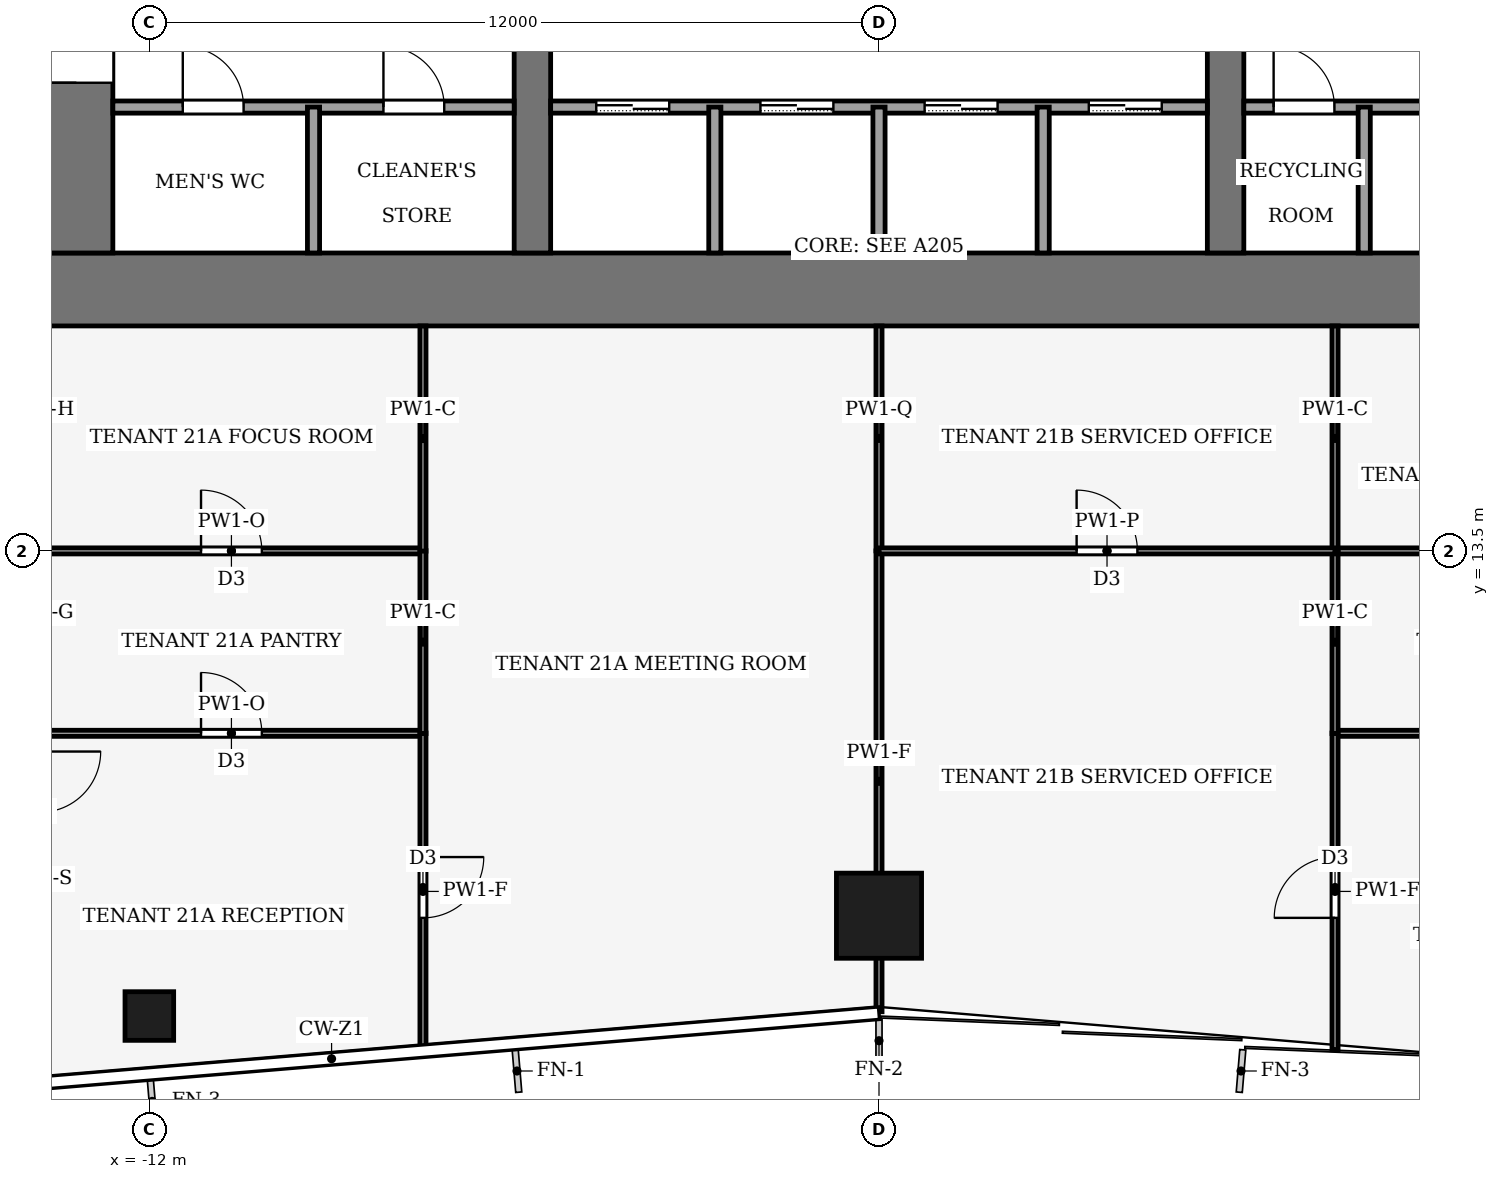
"""IFC4 building model, lengths in metres.
Left out: names, types, materials, properties, quantities, classifications, styles, units other than length and angle.
Written with IfcOpenShell. Run it as: python <this file> out.ifc"""

import sys

from ifc_helpers import new_model, si_unit, direction, frame, frame_2d, origin, origin_2d, place, context, subcontext, project, spatial, rectangle, hollow_rectangle, extrude, element, fill, save


model = new_model("IFC4")
c1 = context("Model", 3, precision=1e-05, world=origin(), true_north=direction((0.0, 1.0)))
c2 = subcontext(c1, "Body", "Model", "MODEL_VIEW")
j1 = project(units=[si_unit("LENGTHUNIT", "METRE"), si_unit("PLANEANGLEUNIT", "RADIAN")], contexts=[c1])
p1 = place(None, origin())
s1 = spatial("IfcSite", under=j1, at=p1, CompositionType="ELEMENT")
p2 = place(p1, origin())
s2 = spatial("IfcBuilding", under=s1, at=p2, CompositionType="ELEMENT")
p3 = place(p2, frame((0.0, 0.0, 94.0)))
s3 = spatial("IfcBuildingStorey", under=s2, at=p3, CompositionType="ELEMENT", Elevation=94.0)
p4 = place(p3, frame((-13.8, 17.8, -0.13), z_axis=(0.0, 0.0, 1.0), x_axis=(1.0, 0.0, 0.0)))
e1 = element("IfcWall", 1, at=p4, inside=s3, PredefinedType="SHEAR", context=c2, shape_type="SweptSolid", body=[
    extrude(rectangle(XDim=27.6, YDim=1.2, at=frame_2d((13.8, 0.0))), origin(), (0.0, 0.0, 1.0), 4.0),
])
p5 = place(p3, frame((-13.2, 18.4, -0.13), z_axis=(0.0, 0.0, 1.0), x_axis=(0.0, 1.0, 0.0)))
e2 = element("IfcWall", 2, at=p5, inside=s3, PredefinedType="SHEAR", context=c2, shape_type="SweptSolid", body=[
    extrude(rectangle(XDim=19.2, YDim=1.2, at=frame_2d((9.6, 0.0))), origin(), (0.0, 0.0, 1.0), 4.0),
])
p6 = place(p5, frame((2.8, 0.0, 0.13)))
e3 = element("IfcOpeningElement", 3, at=p6, cuts=e2, PredefinedType="OPENING", context=c2, shape_type="SweptSolid", body=[
    extrude(rectangle(XDim=2.4, YDim=2.4, at=frame_2d((1.2, 1.2))), frame((0.0, 0.61, 0.0), z_axis=(0.0, -1.0, 0.0), x_axis=(1.0, 0.0, 0.0)), (0.0, 0.0, 1.0), 1.22),
])
p7 = place(p5, frame((13.4, 0.0, 0.13)))
e4 = element("IfcOpeningElement", 4, at=p7, cuts=e2, PredefinedType="OPENING", context=c2, shape_type="SweptSolid", body=[
    extrude(rectangle(XDim=1.4, YDim=2.2, at=frame_2d((0.7, 1.1))), frame((0.0, 0.61, 0.0), z_axis=(0.0, -1.0, 0.0), x_axis=(1.0, 0.0, 0.0)), (0.0, 0.0, 1.0), 1.22),
])
p8 = place(p3, frame((-5.7, 18.4, -0.13), z_axis=(0.0, 0.0, 1.0), x_axis=(0.0, 1.0, 0.0)))
e5 = element("IfcWall", 5, at=p8, inside=s3, PredefinedType="SHEAR", context=c2, shape_type="SweptSolid", body=[
    extrude(rectangle(XDim=19.2, YDim=0.6, at=frame_2d((9.6, 0.0))), origin(), (0.0, 0.0, 1.0), 4.0),
])
p9 = place(p8, frame((8.35, 0.0, 0.13)))
e6 = element("IfcOpeningElement", 6, at=p9, cuts=e5, PredefinedType="OPENING", context=c2, shape_type="SweptSolid", body=[
    extrude(rectangle(XDim=0.9, YDim=2.1, at=frame_2d((0.45, 1.05))), frame((0.0, 0.31, 0.0), z_axis=(0.0, -1.0, 0.0), x_axis=(1.0, 0.0, 0.0)), (0.0, 0.0, 1.0), 0.62),
])
p10 = place(p3, frame((5.7, 18.4, -0.13), z_axis=(0.0, 0.0, 1.0), x_axis=(0.0, 1.0, 0.0)))
e7 = element("IfcWall", 7, at=p10, inside=s3, PredefinedType="SHEAR", context=c2, shape_type="SweptSolid", body=[
    extrude(rectangle(XDim=19.2, YDim=0.6, at=frame_2d((9.6, 0.0))), origin(), (0.0, 0.0, 1.0), 4.0),
])
p11 = place(p10, frame((8.35, 0.0, 0.13)))
e8 = element("IfcOpeningElement", 8, at=p11, cuts=e7, PredefinedType="OPENING", context=c2, shape_type="SweptSolid", body=[
    extrude(rectangle(XDim=0.9, YDim=2.1, at=frame_2d((0.45, 1.05))), frame((0.0, 0.31, 0.0), z_axis=(0.0, -1.0, 0.0), x_axis=(1.0, 0.0, 0.0)), (0.0, 0.0, 1.0), 0.62),
])
p12 = place(p10, frame((13.3, 0.0, 0.13)))
e9 = element("IfcOpeningElement", 9, at=p12, cuts=e7, PredefinedType="OPENING", context=c2, shape_type="SweptSolid", body=[
    extrude(rectangle(XDim=2.4, YDim=2.4, at=frame_2d((1.2, 1.2))), frame((0.0, 0.31, 0.0), z_axis=(0.0, -1.0, 0.0), x_axis=(1.0, 0.0, 0.0)), (0.0, 0.0, 1.0), 0.62),
])
p13 = place(p3, frame((0.0, 7.5, 0.0), z_axis=(0.0, 0.0, 1.0), x_axis=(1.0, 0.0, 0.0)))
e10 = element("IfcColumn", 10, at=p13, inside=s3, PredefinedType="COLUMN", context=c2, shape_type="SweptSolid", body=[
    extrude(hollow_rectangle(XDim=1.4, YDim=1.4, WallThickness=0.08, at=origin_2d()), origin(), (0.0, 0.0, 1.0), 4.0),
])
p14 = place(p3, frame((-12.0, 5.85, 0.0), z_axis=(0.0, 0.0, 1.0), x_axis=(1.0, 0.0, 0.0)))
e11 = element("IfcColumn", 11, at=p14, inside=s3, PredefinedType="COLUMN", context=c2, shape_type="SweptSolid", body=[
    extrude(hollow_rectangle(XDim=0.8, YDim=0.8, WallThickness=0.04, at=origin_2d()), origin(), (0.0, 0.0, 1.0), 4.0),
])
p15 = place(p3, frame((-12.6, 20.8, 0.0), z_axis=(0.0, 0.0, 1.0), x_axis=(1.0, 0.0, 0.0)))
e12 = element("IfcWall", 12, at=p15, inside=s3, PredefinedType="PARTITIONING", context=c2, shape_type="SweptSolid", body=[
    extrude(rectangle(XDim=6.6, YDim=0.2, at=frame_2d((3.3, 0.0))), origin(), (0.0, 0.0, 1.0), 3.87),
])
p16 = place(p15, frame((1.15, 0.0, 0.0)))
e13 = element("IfcOpeningElement", 13, at=p16, cuts=e12, PredefinedType="OPENING", context=c2, shape_type="SweptSolid", body=[
    extrude(rectangle(XDim=1.0, YDim=2.1, at=frame_2d((0.5, 1.05))), frame((0.0, 0.11, 0.0), z_axis=(0.0, -1.0, 0.0), x_axis=(1.0, 0.0, 0.0)), (0.0, 0.0, 1.0), 0.22),
])
p17 = place(p15, frame((4.45, 0.0, 0.0)))
e14 = element("IfcOpeningElement", 14, at=p17, cuts=e12, PredefinedType="OPENING", context=c2, shape_type="SweptSolid", body=[
    extrude(rectangle(XDim=1.0, YDim=2.1, at=frame_2d((0.5, 1.05))), frame((0.0, 0.11, 0.0), z_axis=(0.0, -1.0, 0.0), x_axis=(1.0, 0.0, 0.0)), (0.0, 0.0, 1.0), 0.22),
])
p18 = place(p3, frame((-5.4, 20.8, 0.0), z_axis=(0.0, 0.0, 1.0), x_axis=(1.0, 0.0, 0.0)))
e15 = element("IfcWall", 15, at=p18, inside=s3, PredefinedType="PARTITIONING", context=c2, shape_type="SweptSolid", body=[
    extrude(rectangle(XDim=10.8, YDim=0.2, at=frame_2d((5.4, 0.0))), origin(), (0.0, 0.0, 1.0), 3.87),
])
p19 = place(p18, frame((0.75, 0.0, 0.0)))
e16 = element("IfcOpeningElement", 16, at=p19, cuts=e15, PredefinedType="OPENING", context=c2, shape_type="SweptSolid", body=[
    extrude(rectangle(XDim=1.2, YDim=2.2, at=frame_2d((0.6, 1.1))), frame((0.0, 0.11, 0.0), z_axis=(0.0, -1.0, 0.0), x_axis=(1.0, 0.0, 0.0)), (0.0, 0.0, 1.0), 0.22),
])
p20 = place(p18, frame((3.45, 0.0, 0.0)))
e17 = element("IfcOpeningElement", 17, at=p20, cuts=e15, PredefinedType="OPENING", context=c2, shape_type="SweptSolid", body=[
    extrude(rectangle(XDim=1.2, YDim=2.2, at=frame_2d((0.6, 1.1))), frame((0.0, 0.11, 0.0), z_axis=(0.0, -1.0, 0.0), x_axis=(1.0, 0.0, 0.0)), (0.0, 0.0, 1.0), 0.22),
])
p21 = place(p18, frame((6.15, 0.0, 0.0)))
e18 = element("IfcOpeningElement", 18, at=p21, cuts=e15, PredefinedType="OPENING", context=c2, shape_type="SweptSolid", body=[
    extrude(rectangle(XDim=1.2, YDim=2.2, at=frame_2d((0.6, 1.1))), frame((0.0, 0.11, 0.0), z_axis=(0.0, -1.0, 0.0), x_axis=(1.0, 0.0, 0.0)), (0.0, 0.0, 1.0), 0.22),
])
p22 = place(p18, frame((8.85, 0.0, 0.0)))
e19 = element("IfcOpeningElement", 19, at=p22, cuts=e15, PredefinedType="OPENING", context=c2, shape_type="SweptSolid", body=[
    extrude(rectangle(XDim=1.2, YDim=2.2, at=frame_2d((0.6, 1.1))), frame((0.0, 0.11, 0.0), z_axis=(0.0, -1.0, 0.0), x_axis=(1.0, 0.0, 0.0)), (0.0, 0.0, 1.0), 0.22),
])
p23 = place(p3, frame((6.0, 20.8, 0.0), z_axis=(0.0, 0.0, 1.0), x_axis=(1.0, 0.0, 0.0)))
e20 = element("IfcWall", 20, at=p23, inside=s3, PredefinedType="PARTITIONING", context=c2, shape_type="SweptSolid", body=[
    extrude(rectangle(XDim=6.6, YDim=0.2, at=frame_2d((3.3, 0.0))), origin(), (0.0, 0.0, 1.0), 3.87),
])
p24 = place(p23, frame((0.49, 0.0, 0.0)))
e21 = element("IfcOpeningElement", 21, at=p24, cuts=e20, PredefinedType="OPENING", context=c2, shape_type="SweptSolid", body=[
    extrude(rectangle(XDim=1.0, YDim=2.1, at=frame_2d((0.5, 1.05))), frame((0.0, 0.11, 0.0), z_axis=(0.0, -1.0, 0.0), x_axis=(1.0, 0.0, 0.0)), (0.0, 0.0, 1.0), 0.22),
])
p25 = place(p23, frame((3.79, 0.0, 0.0)))
e22 = element("IfcOpeningElement", 22, at=p25, cuts=e20, PredefinedType="OPENING", context=c2, shape_type="SweptSolid", body=[
    extrude(rectangle(XDim=1.0, YDim=2.1, at=frame_2d((0.5, 1.05))), frame((0.0, 0.11, 0.0), z_axis=(0.0, -1.0, 0.0), x_axis=(1.0, 0.0, 0.0)), (0.0, 0.0, 1.0), 0.22),
])
for number, where, z_axis, x_axis in (
    (23, (-9.3, 18.4, 0.0), (0.0, 0.0, 1.0), (0.0, 1.0, 0.0)),
    (24, (-2.7, 18.4, 0.0), (0.0, 0.0, 1.0), (0.0, 1.0, 0.0)),
    (25, (0.0, 18.4, 0.0), (0.0, 0.0, 1.0), (0.0, 1.0, 0.0)),
    (26, (2.7, 18.4, 0.0), (0.0, 0.0, 1.0), (0.0, 1.0, 0.0)),
    (27, (7.98, 18.4, 0.0), (0.0, 0.0, 1.0), (0.0, 1.0, 0.0)),
):
    element("IfcWall", number, at=place(p3, frame(where, z_axis=z_axis, x_axis=x_axis)), inside=s3, PredefinedType="PARTITIONING", context=c2, shape_type="SweptSolid", body=[
        extrude(rectangle(XDim=2.4, YDim=0.2, at=frame_2d((1.2, 0.0))), origin(), (0.0, 0.0, 1.0), 3.87),
    ])
p26 = place(p3, frame((-13.8, 10.5, 0.0), z_axis=(0.0, 0.0, 1.0), x_axis=(1.0, 0.0, 0.0)))
e28 = element("IfcWall", 28, at=p26, inside=s3, PredefinedType="PARTITIONING", context=c2, shape_type="SweptSolid", body=[
    extrude(rectangle(XDim=6.3, YDim=0.1, at=frame_2d((3.15, 0.0))), origin(), (0.0, 0.0, 1.0), 3.39),
])
p27 = place(p26, frame((2.65, 0.0, 0.0)))
e29 = element("IfcOpeningElement", 29, at=p27, cuts=e28, PredefinedType="OPENING", context=c2, shape_type="SweptSolid", body=[
    extrude(rectangle(XDim=1.0, YDim=2.1, at=frame_2d((0.5, 1.05))), frame((0.0, 0.06, 0.0), z_axis=(0.0, -1.0, 0.0), x_axis=(1.0, 0.0, 0.0)), (0.0, 0.0, 1.0), 0.12),
])
p28 = place(p3, frame((-7.5, 10.504, 0.0), z_axis=(0.0, 0.0, 1.0), x_axis=(0.0, -1.0, 0.0)))
e30 = element("IfcWall", 30, at=p28, inside=s3, PredefinedType="PARTITIONING", context=c2, shape_type="SweptSolid", body=[
    extrude(rectangle(XDim=5.209, YDim=0.1, at=frame_2d((2.604, 0.0))), origin(), (0.0, 0.0, 1.0), 3.04),
])
p29 = place(p28, frame((2.039, 0.0, 0.0)))
e31 = element("IfcOpeningElement", 31, at=p29, cuts=e30, PredefinedType="OPENING", context=c2, shape_type="SweptSolid", body=[
    extrude(rectangle(XDim=1.0, YDim=2.1, at=frame_2d((0.5, 1.05))), frame((0.0, 0.06, 0.0), z_axis=(0.0, -1.0, 0.0), x_axis=(1.0, 0.0, 0.0)), (0.0, 0.0, 1.0), 0.12),
])
p30 = place(p3, frame((-13.8, 13.5, 0.0), z_axis=(0.0, 0.0, 1.0), x_axis=(1.0, 0.0, 0.0)))
e32 = element("IfcWall", 32, at=p30, inside=s3, PredefinedType="PARTITIONING", context=c2, shape_type="SweptSolid", body=[
    extrude(rectangle(XDim=6.3, YDim=0.1, at=frame_2d((3.15, 0.0))), origin(), (0.0, 0.0, 1.0), 3.39),
])
p31 = place(p30, frame((2.65, 0.0, 0.0)))
e33 = element("IfcOpeningElement", 33, at=p31, cuts=e32, PredefinedType="OPENING", context=c2, shape_type="SweptSolid", body=[
    extrude(rectangle(XDim=1.0, YDim=2.1, at=frame_2d((0.5, 1.05))), frame((0.0, 0.06, 0.0), z_axis=(0.0, -1.0, 0.0), x_axis=(1.0, 0.0, 0.0)), (0.0, 0.0, 1.0), 0.12),
])
p32 = place(p3, frame((-7.5, 10.496, 0.0), z_axis=(0.0, 0.0, 1.0), x_axis=(0.0, 1.0, 0.0)))
e34 = element("IfcWall", 34, at=p32, inside=s3, PredefinedType="PARTITIONING", context=c2, shape_type="SweptSolid", body=[
    extrude(rectangle(XDim=3.008, YDim=0.1, at=frame_2d((1.504, 0.0))), origin(), (0.0, 0.0, 1.0), 3.87),
])
p33 = place(p3, frame((-7.5, 13.496, 0.0), z_axis=(0.0, 0.0, 1.0), x_axis=(0.0, 1.0, 0.0)))
e35 = element("IfcWall", 35, at=p33, inside=s3, PredefinedType="PARTITIONING", context=c2, shape_type="SweptSolid", body=[
    extrude(rectangle(XDim=3.704, YDim=0.1, at=frame_2d((1.852, 0.0))), origin(), (0.0, 0.0, 1.0), 3.87),
])
p34 = place(p3, frame((0.0, 5.92, 0.0), z_axis=(0.0, 0.0, 1.0), x_axis=(0.0, 1.0, 0.0)))
e36 = element("IfcWall", 36, at=p34, inside=s3, PredefinedType="PARTITIONING", context=c2, shape_type="SweptSolid", body=[
    extrude(rectangle(XDim=7.58, YDim=0.1, at=frame_2d((3.79, 0.0))), origin(), (0.0, 0.0, 1.0), 3.04),
])
p35 = place(p3, frame((0.0, 13.5, 0.0), z_axis=(0.0, 0.0, 1.0), x_axis=(0.0, 1.0, 0.0)))
e37 = element("IfcWall", 37, at=p35, inside=s3, PredefinedType="PARTITIONING", context=c2, shape_type="SweptSolid", body=[
    extrude(rectangle(XDim=3.7, YDim=0.1, at=frame_2d((1.85, 0.0))), origin(), (0.0, 0.0, 1.0), 3.48),
])
p36 = place(p3, frame((7.5, 10.5, 0.0), z_axis=(0.0, 0.0, 1.0), x_axis=(1.0, 0.0, 0.0)))
e38 = element("IfcWall", 38, at=p36, inside=s3, PredefinedType="PARTITIONING", context=c2, shape_type="SweptSolid", body=[
    extrude(rectangle(XDim=6.3, YDim=0.1, at=frame_2d((3.15, 0.0))), origin(), (0.0, 0.0, 1.0), 3.39),
])
p37 = place(p36, frame((2.65, 0.0, 0.0)))
e39 = element("IfcOpeningElement", 39, at=p37, cuts=e38, PredefinedType="OPENING", context=c2, shape_type="SweptSolid", body=[
    extrude(rectangle(XDim=1.0, YDim=2.1, at=frame_2d((0.5, 1.05))), frame((0.0, 0.06, 0.0), z_axis=(0.0, -1.0, 0.0), x_axis=(1.0, 0.0, 0.0)), (0.0, 0.0, 1.0), 0.12),
])
p38 = place(p3, frame((7.5, 5.295, 0.0), z_axis=(0.0, 0.0, 1.0), x_axis=(0.0, 1.0, 0.0)))
e40 = element("IfcWall", 40, at=p38, inside=s3, PredefinedType="PARTITIONING", context=c2, shape_type="SweptSolid", body=[
    extrude(rectangle(XDim=5.209, YDim=0.1, at=frame_2d((2.604, 0.0))), origin(), (0.0, 0.0, 1.0), 3.04),
])
p39 = place(p38, frame((2.17, 0.0, 0.0)))
e41 = element("IfcOpeningElement", 41, at=p39, cuts=e40, PredefinedType="OPENING", context=c2, shape_type="SweptSolid", body=[
    extrude(rectangle(XDim=1.0, YDim=2.1, at=frame_2d((0.5, 1.05))), frame((0.0, 0.06, 0.0), z_axis=(0.0, -1.0, 0.0), x_axis=(1.0, 0.0, 0.0)), (0.0, 0.0, 1.0), 0.12),
])
p40 = place(p3, frame((13.8, 13.5, 0.0), z_axis=(0.0, 0.0, 1.0), x_axis=(-1.0, 0.0, 0.0)))
e42 = element("IfcWall", 42, at=p40, inside=s3, PredefinedType="PARTITIONING", context=c2, shape_type="SweptSolid", body=[
    extrude(rectangle(XDim=6.3, YDim=0.1, at=frame_2d((3.15, 0.0))), origin(), (0.0, 0.0, 1.0), 3.39),
])
p41 = place(p3, frame((7.5, 13.5, 0.0), z_axis=(0.0, 0.0, 1.0), x_axis=(0.0, -1.0, 0.0)))
e43 = element("IfcWall", 43, at=p41, inside=s3, PredefinedType="PARTITIONING", context=c2, shape_type="SweptSolid", body=[
    extrude(rectangle(XDim=3.004, YDim=0.1, at=frame_2d((1.502, 0.0))), origin(), (0.0, 0.0, 1.0), 3.87),
])
p42 = place(p3, frame((7.5, 17.2, 0.0), z_axis=(0.0, 0.0, 1.0), x_axis=(0.0, -1.0, 0.0)))
e44 = element("IfcWall", 44, at=p42, inside=s3, PredefinedType="PARTITIONING", context=c2, shape_type="SweptSolid", body=[
    extrude(rectangle(XDim=3.7, YDim=0.1, at=frame_2d((1.85, 0.0))), origin(), (0.0, 0.0, 1.0), 3.87),
])
p43 = place(p3, frame((0.0, 13.5, 0.0), z_axis=(0.0, 0.0, 1.0), x_axis=(1.0, 0.0, 0.0)))
e45 = element("IfcWall", 45, at=p43, inside=s3, PredefinedType="PARTITIONING", context=c2, shape_type="SweptSolid", body=[
    extrude(rectangle(XDim=7.5, YDim=0.1, at=frame_2d((3.75, 0.0))), origin(), (0.0, 0.0, 1.0), 3.44),
])
p44 = place(p43, frame((3.25, 0.0, 0.0)))
e46 = element("IfcOpeningElement", 46, at=p44, cuts=e45, PredefinedType="OPENING", context=c2, shape_type="SweptSolid", body=[
    extrude(rectangle(XDim=1.0, YDim=2.1, at=frame_2d((0.5, 1.05))), frame((0.0, 0.06, 0.0), z_axis=(0.0, -1.0, 0.0), x_axis=(1.0, 0.0, 0.0)), (0.0, 0.0, 1.0), 0.12),
])
p45 = place(p19, origin())
e47 = element("IfcDoor", 47, at=p45, inside=s3, OperationType="SLIDING_TO_LEFT", PredefinedType="DOOR", context=c2, shape_type="SweptSolid", body=[
    extrude(rectangle(XDim=1.2, YDim=2.2, at=frame_2d((0.6, 1.1))), frame((0.0, 0.025, 0.0), z_axis=(0.0, -1.0, 0.0), x_axis=(1.0, 0.0, 0.0)), (0.0, 0.0, 1.0), 0.05),
])
fill(e16, e47)
p46 = place(p20, origin())
e48 = element("IfcDoor", 48, at=p46, inside=s3, OperationType="SLIDING_TO_LEFT", PredefinedType="DOOR", context=c2, shape_type="SweptSolid", body=[
    extrude(rectangle(XDim=1.2, YDim=2.2, at=frame_2d((0.6, 1.1))), frame((0.0, 0.025, 0.0), z_axis=(0.0, -1.0, 0.0), x_axis=(1.0, 0.0, 0.0)), (0.0, 0.0, 1.0), 0.05),
])
fill(e17, e48)
p47 = place(p21, origin())
e49 = element("IfcDoor", 49, at=p47, inside=s3, OperationType="SLIDING_TO_LEFT", PredefinedType="DOOR", context=c2, shape_type="SweptSolid", body=[
    extrude(rectangle(XDim=1.2, YDim=2.2, at=frame_2d((0.6, 1.1))), frame((0.0, 0.025, 0.0), z_axis=(0.0, -1.0, 0.0), x_axis=(1.0, 0.0, 0.0)), (0.0, 0.0, 1.0), 0.05),
])
fill(e18, e49)
p48 = place(p22, origin())
e50 = element("IfcDoor", 50, at=p48, inside=s3, OperationType="SLIDING_TO_LEFT", PredefinedType="DOOR", context=c2, shape_type="SweptSolid", body=[
    extrude(rectangle(XDim=1.2, YDim=2.2, at=frame_2d((0.6, 1.1))), frame((0.0, 0.025, 0.0), z_axis=(0.0, -1.0, 0.0), x_axis=(1.0, 0.0, 0.0)), (0.0, 0.0, 1.0), 0.05),
])
fill(e19, e50)
p49 = place(p16, origin())
e51 = element("IfcDoor", 51, at=p49, inside=s3, OperationType="SINGLE_SWING_LEFT", PredefinedType="DOOR", context=c2, shape_type="SweptSolid", body=[
    extrude(rectangle(XDim=1.0, YDim=2.1, at=frame_2d((0.5, 1.05))), frame((0.0, 0.025, 0.0), z_axis=(0.0, -1.0, 0.0), x_axis=(1.0, 0.0, 0.0)), (0.0, 0.0, 1.0), 0.05),
])
fill(e13, e51)
p50 = place(p17, origin())
e52 = element("IfcDoor", 52, at=p50, inside=s3, OperationType="SINGLE_SWING_LEFT", PredefinedType="DOOR", context=c2, shape_type="SweptSolid", body=[
    extrude(rectangle(XDim=1.0, YDim=2.1, at=frame_2d((0.5, 1.05))), frame((0.0, 0.025, 0.0), z_axis=(0.0, -1.0, 0.0), x_axis=(1.0, 0.0, 0.0)), (0.0, 0.0, 1.0), 0.05),
])
fill(e14, e52)
p51 = place(p24, origin())
e53 = element("IfcDoor", 53, at=p51, inside=s3, OperationType="SINGLE_SWING_RIGHT", PredefinedType="DOOR", context=c2, shape_type="SweptSolid", body=[
    extrude(rectangle(XDim=1.0, YDim=2.1, at=frame_2d((0.5, 1.05))), frame((0.0, 0.025, 0.0), z_axis=(0.0, -1.0, 0.0), x_axis=(1.0, 0.0, 0.0)), (0.0, 0.0, 1.0), 0.05),
])
fill(e21, e53)
p52 = place(p6, origin())
e54 = element("IfcDoor", 54, at=p52, inside=s3, OperationType="DOUBLE_DOOR_SINGLE_SWING", PredefinedType="DOOR", context=c2, shape_type="SweptSolid", body=[
    extrude(rectangle(XDim=2.4, YDim=2.4, at=frame_2d((1.2, 1.2))), frame((0.0, 0.025, 0.0), z_axis=(0.0, -1.0, 0.0), x_axis=(1.0, 0.0, 0.0)), (0.0, 0.0, 1.0), 0.05),
])
fill(e3, e54)
p53 = place(p27, origin())
e55 = element("IfcDoor", 55, at=p53, inside=s3, OperationType="SINGLE_SWING_LEFT", PredefinedType="DOOR", context=c2, shape_type="SweptSolid", body=[
    extrude(rectangle(XDim=1.0, YDim=2.1, at=frame_2d((0.5, 1.05))), frame((0.0, 0.025, 0.0), z_axis=(0.0, -1.0, 0.0), x_axis=(1.0, 0.0, 0.0)), (0.0, 0.0, 1.0), 0.05),
])
fill(e29, e55)
p54 = place(p29, origin())
e56 = element("IfcDoor", 56, at=p54, inside=s3, OperationType="SINGLE_SWING_LEFT", PredefinedType="DOOR", context=c2, shape_type="SweptSolid", body=[
    extrude(rectangle(XDim=1.0, YDim=2.1, at=frame_2d((0.5, 1.05))), frame((0.0, 0.025, 0.0), z_axis=(0.0, -1.0, 0.0), x_axis=(1.0, 0.0, 0.0)), (0.0, 0.0, 1.0), 0.05),
])
fill(e31, e56)
p55 = place(p31, origin())
e57 = element("IfcDoor", 57, at=p55, inside=s3, OperationType="SINGLE_SWING_LEFT", PredefinedType="DOOR", context=c2, shape_type="SweptSolid", body=[
    extrude(rectangle(XDim=1.0, YDim=2.1, at=frame_2d((0.5, 1.05))), frame((0.0, 0.025, 0.0), z_axis=(0.0, -1.0, 0.0), x_axis=(1.0, 0.0, 0.0)), (0.0, 0.0, 1.0), 0.05),
])
fill(e33, e57)
p56 = place(p39, origin())
e58 = element("IfcDoor", 58, at=p56, inside=s3, OperationType="SINGLE_SWING_RIGHT", PredefinedType="DOOR", context=c2, shape_type="SweptSolid", body=[
    extrude(rectangle(XDim=1.0, YDim=2.1, at=frame_2d((0.5, 1.05))), frame((0.0, 0.025, 0.0), z_axis=(0.0, -1.0, 0.0), x_axis=(1.0, 0.0, 0.0)), (0.0, 0.0, 1.0), 0.05),
])
fill(e41, e58)
p57 = place(p44, origin())
e59 = element("IfcDoor", 59, at=p57, inside=s3, OperationType="SINGLE_SWING_RIGHT", PredefinedType="DOOR", context=c2, shape_type="SweptSolid", body=[
    extrude(rectangle(XDim=1.0, YDim=2.1, at=frame_2d((0.5, 1.05))), frame((0.0, 0.025, 0.0), z_axis=(0.0, -1.0, 0.0), x_axis=(1.0, 0.0, 0.0)), (0.0, 0.0, 1.0), 0.05),
])
fill(e46, e59)
save(model, sys.argv[1])
